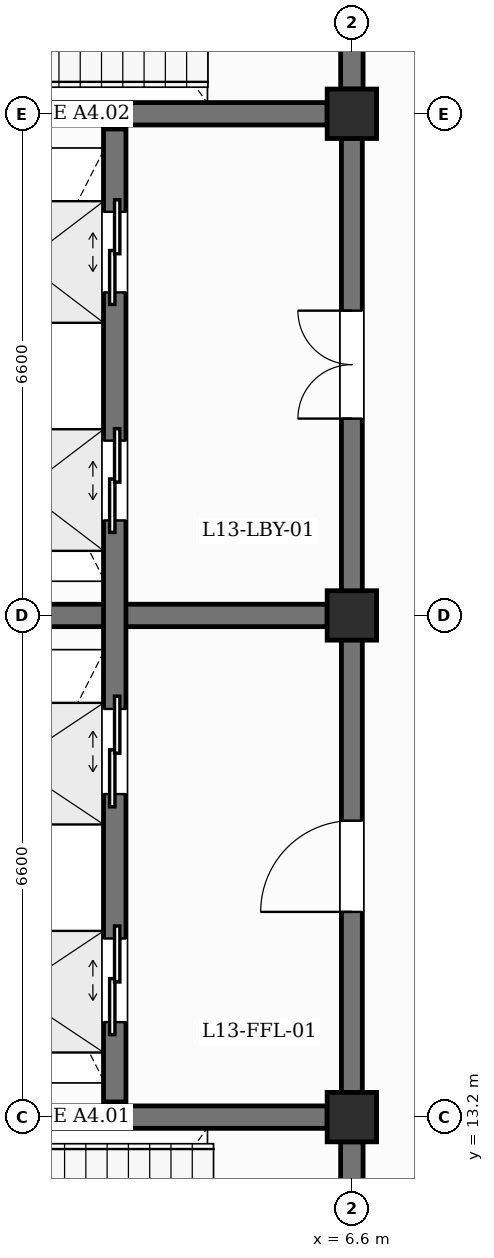
"""IFC4 building model, lengths in metres.
Left out: names, types, materials, properties, quantities, classifications, styles, units other than length and angle.
Written with IfcOpenShell. Run it as: python <this file> out.ifc"""

import sys

from ifc_helpers import new_model, si_unit, direction, frame, frame_2d, origin, origin_2d, place, context, subcontext, project, spatial, rectangle, extrude, element, fill, save


model = new_model("IFC4")
c1 = context("Model", 3, precision=1e-05, world=origin(), true_north=direction((0.0, 1.0)))
c2 = subcontext(c1, "Body", "Model", "MODEL_VIEW")
j1 = project(units=[si_unit("LENGTHUNIT", "METRE"), si_unit("PLANEANGLEUNIT", "RADIAN")], contexts=[c1])
p1 = place(None, origin())
s1 = spatial("IfcSite", under=j1, at=p1, CompositionType="ELEMENT")
p2 = place(p1, origin())
s2 = spatial("IfcBuilding", under=s1, at=p2, CompositionType="ELEMENT")
p3 = place(p2, frame((0.0, 0.0, 56.4)))
s3 = spatial("IfcBuildingStorey", under=s2, at=p3, CompositionType="ELEMENT", Elevation=56.4)
for number, where, z_axis, x_axis in (
    (1, (6.6, 13.2, 0.0), (0.0, 0.0, 1.0), (1.0, 0.0, 0.0)),
    (2, (6.6, 19.8, 0.0), (0.0, 0.0, 1.0), (1.0, 0.0, 0.0)),
    (3, (6.6, 26.4, 0.0), (0.0, 0.0, 1.0), (1.0, 0.0, 0.0)),
):
    element("IfcColumn", number, at=place(p3, frame(where, z_axis=z_axis, x_axis=x_axis)), inside=s3, PredefinedType="COLUMN", context=c2, shape_type="SweptSolid", body=[
        extrude(rectangle(XDim=0.65, YDim=0.65, at=origin_2d()), origin(), (0.0, 0.0, 1.0), 4.2),
    ])
p4 = place(p3, frame((0.325, 13.2, 0.0), z_axis=(0.0, 0.0, 1.0), x_axis=(1.0, 0.0, 0.0)))
e4 = element("IfcWall", 4, at=p4, inside=s3, PredefinedType="SHEAR", context=c2, shape_type="SweptSolid", body=[
    extrude(rectangle(XDim=5.95, YDim=0.295, at=frame_2d((2.975, 0.0))), origin(), (0.0, 0.0, 1.0), 3.3),
])
p5 = place(p3, frame((6.6, 6.925, 0.0), z_axis=(0.0, 0.0, 1.0), x_axis=(0.0, 1.0, 0.0)))
e5 = element("IfcWall", 5, at=p5, inside=s3, PredefinedType="SHEAR", context=c2, shape_type="SweptSolid", body=[
    extrude(rectangle(XDim=5.95, YDim=0.295, at=frame_2d((2.975, 0.0))), origin(), (0.0, 0.0, 1.0), 3.3),
])
p6 = place(p5, frame((2.425, 0.0, 0.0)))
e6 = element("IfcOpeningElement", 6, at=p6, cuts=e5, PredefinedType="OPENING", context=c2, shape_type="SweptSolid", body=[
    extrude(rectangle(XDim=1.1, YDim=2.15, at=frame_2d((0.55, 1.075))), frame((0.0, 0.157, 0.0), z_axis=(0.0, -1.0, 0.0), x_axis=(1.0, 0.0, 0.0)), (0.0, 0.0, 1.0), 0.315),
])
p7 = place(p3, frame((0.325, 26.4, 0.0), z_axis=(0.0, 0.0, 1.0), x_axis=(1.0, 0.0, 0.0)))
e7 = element("IfcWall", 7, at=p7, inside=s3, PredefinedType="SHEAR", context=c2, shape_type="SweptSolid", body=[
    extrude(rectangle(XDim=5.95, YDim=0.295, at=frame_2d((2.975, 0.0))), origin(), (0.0, 0.0, 1.0), 3.3),
])
p8 = place(p3, frame((6.6, 26.725, 0.0), z_axis=(0.0, 0.0, 1.0), x_axis=(0.0, 1.0, 0.0)))
e8 = element("IfcWall", 8, at=p8, inside=s3, PredefinedType="SHEAR", context=c2, shape_type="SweptSolid", body=[
    extrude(rectangle(XDim=5.95, YDim=0.295, at=frame_2d((2.975, 0.0))), origin(), (0.0, 0.0, 1.0), 3.3),
])
p9 = place(p8, frame((2.425, 0.0, 0.0)))
e9 = element("IfcOpeningElement", 9, at=p9, cuts=e8, PredefinedType="OPENING", context=c2, shape_type="SweptSolid", body=[
    extrude(rectangle(XDim=1.1, YDim=2.15, at=frame_2d((0.55, 1.075))), frame((0.0, 0.157, 0.0), z_axis=(0.0, -1.0, 0.0), x_axis=(1.0, 0.0, 0.0)), (0.0, 0.0, 1.0), 0.315),
])
p10 = place(p3, frame((0.325, 19.8, 0.0), z_axis=(0.0, 0.0, 1.0), x_axis=(1.0, 0.0, 0.0)))
e10 = element("IfcWall", 10, at=p10, inside=s3, PredefinedType="SHEAR", context=c2, shape_type="SweptSolid", body=[
    extrude(rectangle(XDim=5.95, YDim=0.295, at=frame_2d((2.975, 0.0))), origin(), (0.0, 0.0, 1.0), 3.3),
])
p11 = place(p3, frame((6.6, 13.525, 0.0), z_axis=(0.0, 0.0, 1.0), x_axis=(0.0, 1.0, 0.0)))
e11 = element("IfcWall", 11, at=p11, inside=s3, PredefinedType="SHEAR", context=c2, shape_type="SweptSolid", body=[
    extrude(rectangle(XDim=5.95, YDim=0.275, at=frame_2d((2.975, 0.0))), origin(), (0.0, 0.0, 1.0), 3.3),
])
p12 = place(p11, frame((2.375, 0.0, 0.0)))
e12 = element("IfcOpeningElement", 12, at=p12, cuts=e11, PredefinedType="OPENING", context=c2, shape_type="SweptSolid", body=[
    extrude(rectangle(XDim=1.2, YDim=2.25, at=frame_2d((0.6, 1.125))), frame((0.0, 0.147, 0.0), z_axis=(0.0, -1.0, 0.0), x_axis=(1.0, 0.0, 0.0)), (0.0, 0.0, 1.0), 0.295),
])
p13 = place(p3, frame((6.6, 20.125, 0.0), z_axis=(0.0, 0.0, 1.0), x_axis=(0.0, 1.0, 0.0)))
e13 = element("IfcWall", 13, at=p13, inside=s3, PredefinedType="SHEAR", context=c2, shape_type="SweptSolid", body=[
    extrude(rectangle(XDim=5.95, YDim=0.275, at=frame_2d((2.975, 0.0))), origin(), (0.0, 0.0, 1.0), 3.3),
])
p14 = place(p13, frame((2.265, 0.0, 0.0)))
e14 = element("IfcOpeningElement", 14, at=p14, cuts=e13, PredefinedType="OPENING", context=c2, shape_type="SweptSolid", body=[
    extrude(rectangle(XDim=1.42, YDim=2.2, at=frame_2d((0.71, 1.1))), frame((0.0, 0.147, 0.0), z_axis=(0.0, -1.0, 0.0), x_axis=(1.0, 0.0, 0.0)), (0.0, 0.0, 1.0), 0.295),
])
p15 = place(p3, frame((3.48, 13.4, 0.0), z_axis=(0.0, 0.0, 1.0), x_axis=(0.0, 1.0, 0.0)))
e15 = element("IfcWall", 15, at=p15, inside=s3, PredefinedType="SHEAR", context=c2, shape_type="SweptSolid", body=[
    extrude(rectangle(XDim=6.2, YDim=0.295, at=frame_2d((3.1, 0.0))), origin(), (0.0, 0.0, 1.0), 3.9),
])
p16 = place(p15, frame((1.05, 0.0, 0.0)))
e16 = element("IfcOpeningElement", 16, at=p16, cuts=e15, PredefinedType="OPENING", context=c2, shape_type="SweptSolid", body=[
    extrude(rectangle(XDim=1.1, YDim=2.15, at=frame_2d((0.55, 1.075))), frame((0.0, 0.157, 0.0), z_axis=(0.0, -1.0, 0.0), x_axis=(1.0, 0.0, 0.0)), (0.0, 0.0, 1.0), 0.315),
])
p17 = place(p15, frame((4.05, 0.0, 0.0)))
e17 = element("IfcOpeningElement", 17, at=p17, cuts=e15, PredefinedType="OPENING", context=c2, shape_type="SweptSolid", body=[
    extrude(rectangle(XDim=1.12, YDim=2.15, at=frame_2d((0.56, 1.075))), frame((0.0, 0.157, 0.0), z_axis=(0.0, -1.0, 0.0), x_axis=(1.0, 0.0, 0.0)), (0.0, 0.0, 1.0), 0.315),
])
p18 = place(p3, frame((3.48, 20.0, 0.0), z_axis=(0.0, 0.0, 1.0), x_axis=(0.0, 1.0, 0.0)))
e18 = element("IfcWall", 18, at=p18, inside=s3, PredefinedType="SHEAR", context=c2, shape_type="SweptSolid", body=[
    extrude(rectangle(XDim=6.2, YDim=0.295, at=frame_2d((3.1, 0.0))), origin(), (0.0, 0.0, 1.0), 3.9),
])
p19 = place(p18, frame((1.05, 0.0, 0.0)))
e19 = element("IfcOpeningElement", 19, at=p19, cuts=e18, PredefinedType="OPENING", context=c2, shape_type="SweptSolid", body=[
    extrude(rectangle(XDim=1.05, YDim=2.15, at=frame_2d((0.525, 1.075))), frame((0.0, 0.157, 0.0), z_axis=(0.0, -1.0, 0.0), x_axis=(1.0, 0.0, 0.0)), (0.0, 0.0, 1.0), 0.315),
])
p20 = place(p18, frame((4.05, 0.0, 0.0)))
e20 = element("IfcOpeningElement", 20, at=p20, cuts=e18, PredefinedType="OPENING", context=c2, shape_type="SweptSolid", body=[
    extrude(rectangle(XDim=1.06, YDim=2.15, at=frame_2d((0.53, 1.075))), frame((0.0, 0.157, 0.0), z_axis=(0.0, -1.0, 0.0), x_axis=(1.0, 0.0, 0.0)), (0.0, 0.0, 1.0), 0.315),
])
p21 = place(p16, origin())
e21 = element("IfcDoor", 21, at=p21, inside=s3, OperationType="DOUBLE_DOOR_SLIDING", PredefinedType="USERDEFINED", context=c2, shape_type="SweptSolid", body=[
    extrude(rectangle(XDim=1.1, YDim=2.15, at=frame_2d((0.55, 1.075))), frame((0.0, 0.025, 0.0), z_axis=(0.0, -1.0, 0.0), x_axis=(1.0, 0.0, 0.0)), (0.0, 0.0, 1.0), 0.05),
])
fill(e16, e21)
p22 = place(p17, origin())
e22 = element("IfcDoor", 22, at=p22, inside=s3, OperationType="DOUBLE_DOOR_SLIDING", PredefinedType="USERDEFINED", context=c2, shape_type="SweptSolid", body=[
    extrude(rectangle(XDim=1.12, YDim=2.15, at=frame_2d((0.56, 1.075))), frame((0.0, 0.025, 0.0), z_axis=(0.0, -1.0, 0.0), x_axis=(1.0, 0.0, 0.0)), (0.0, 0.0, 1.0), 0.05),
])
fill(e17, e22)
p23 = place(p19, origin())
e23 = element("IfcDoor", 23, at=p23, inside=s3, OperationType="DOUBLE_DOOR_SLIDING", PredefinedType="USERDEFINED", context=c2, shape_type="SweptSolid", body=[
    extrude(rectangle(XDim=1.05, YDim=2.15, at=frame_2d((0.525, 1.075))), frame((0.0, 0.025, 0.0), z_axis=(0.0, -1.0, 0.0), x_axis=(1.0, 0.0, 0.0)), (0.0, 0.0, 1.0), 0.05),
])
fill(e19, e23)
p24 = place(p20, origin())
e24 = element("IfcDoor", 24, at=p24, inside=s3, OperationType="DOUBLE_DOOR_SLIDING", PredefinedType="USERDEFINED", context=c2, shape_type="SweptSolid", body=[
    extrude(rectangle(XDim=1.06, YDim=2.15, at=frame_2d((0.53, 1.075))), frame((0.0, 0.025, 0.0), z_axis=(0.0, -1.0, 0.0), x_axis=(1.0, 0.0, 0.0)), (0.0, 0.0, 1.0), 0.05),
])
fill(e20, e24)
p25 = place(p12, origin())
e25 = element("IfcDoor", 25, at=p25, inside=s3, OperationType="SINGLE_SWING_LEFT", PredefinedType="DOOR", context=c2, shape_type="SweptSolid", body=[
    extrude(rectangle(XDim=1.2, YDim=2.25, at=frame_2d((0.6, 1.125))), frame((0.0, 0.025, 0.0), z_axis=(0.0, -1.0, 0.0), x_axis=(1.0, 0.0, 0.0)), (0.0, 0.0, 1.0), 0.05),
])
fill(e12, e25)
p26 = place(p14, origin())
e26 = element("IfcDoor", 26, at=p26, inside=s3, OperationType="DOUBLE_DOOR_SINGLE_SWING", PredefinedType="DOOR", context=c2, shape_type="SweptSolid", body=[
    extrude(rectangle(XDim=1.42, YDim=2.2, at=frame_2d((0.71, 1.1))), frame((0.0, 0.025, 0.0), z_axis=(0.0, -1.0, 0.0), x_axis=(1.0, 0.0, 0.0)), (0.0, 0.0, 1.0), 0.05),
])
fill(e14, e26)
save(model, sys.argv[1])
